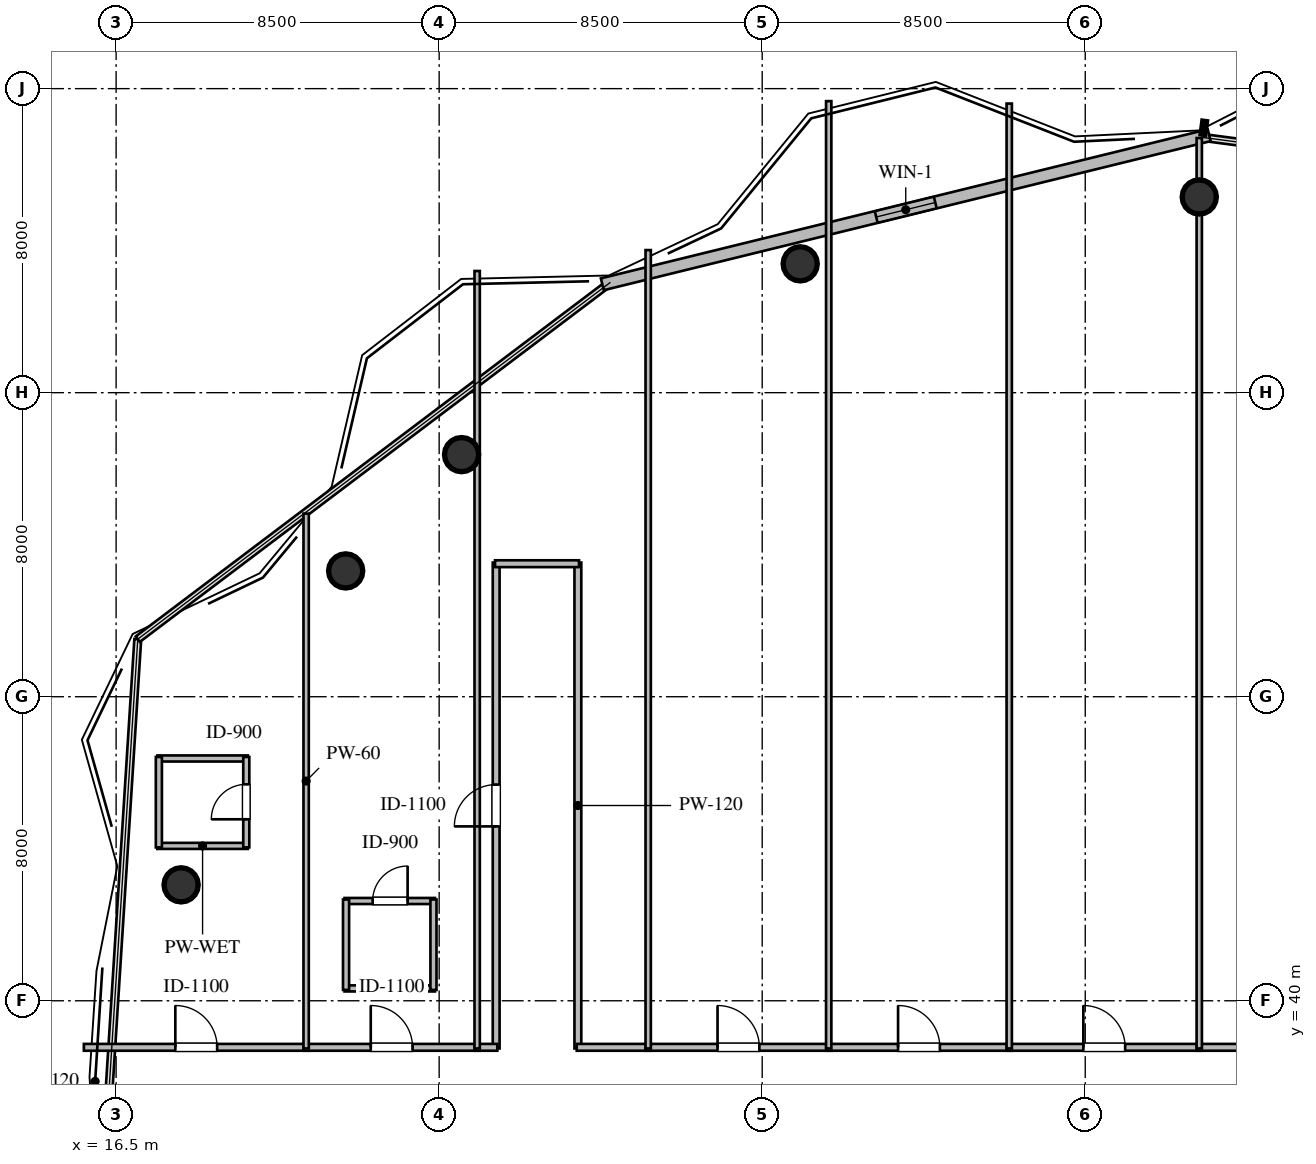
"""IFC4 building model, lengths in metres.
Left out: names, types, materials, properties, quantities, classifications, styles, units other than length and angle.
Written with IfcOpenShell. Run it as: python <this file> out.ifc"""

import sys

from ifc_helpers import new_model, si_unit, direction, frame, frame_2d, origin, origin_2d, place, context, subcontext, project, spatial, rectangle, circle, extrude, element, fill, save


model = new_model("IFC4")
c1 = context("Model", 3, precision=1e-05, world=origin(), true_north=direction((0.0, 1.0)))
c2 = subcontext(c1, "Body", "Model", "MODEL_VIEW")
j1 = project(units=[si_unit("LENGTHUNIT", "METRE"), si_unit("PLANEANGLEUNIT", "RADIAN")], contexts=[c1])
p1 = place(None, origin())
s1 = spatial("IfcSite", under=j1, at=p1, CompositionType="ELEMENT")
p2 = place(p1, origin())
s2 = spatial("IfcBuilding", under=s1, at=p2, CompositionType="ELEMENT")
p3 = place(p2, frame((0.0, 0.0, 258.6)))
s3 = spatial("IfcBuildingStorey", under=s2, at=p3, CompositionType="ELEMENT", Elevation=258.6)
for number, where, z_axis, x_axis in (
    (1, (45.0, 61.15, -0.24), (0.0, 0.0, 1.0), (1.0, 0.0, 0.0)),
    (2, (34.5, 59.39, -0.24), (0.0, 0.0, 1.0), (1.0, 0.0, 0.0)),
    (3, (25.59, 54.37, -0.24), (0.0, 0.0, 1.0), (1.0, 0.0, 0.0)),
    (4, (22.54, 51.31, -0.24), (0.0, 0.0, 1.0), (1.0, 0.0, 0.0)),
    (5, (18.21, 43.05, -0.24), (0.0, 0.0, 1.0), (1.0, 0.0, 0.0)),
):
    element("IfcColumn", number, at=place(p3, frame(where, z_axis=z_axis, x_axis=x_axis)), inside=s3, PredefinedType="COLUMN", context=c2, shape_type="SweptSolid", body=[
        extrude(circle(Radius=0.45, at=origin_2d()), origin(), (0.0, 0.0, 1.0), 4.04),
    ])
p4 = place(p3, frame((29.293, 58.852, 0.0), z_axis=(0.0, 0.0, 1.0), x_axis=(0.971137749742, 0.238519330508, 0.0)))
e6 = element("IfcWall", 6, at=p4, inside=s3, PredefinedType="STANDARD", context=c2, shape_type="SweptSolid", body=[
    extrude(rectangle(XDim=16.443, YDim=0.32, at=frame_2d((8.221, 0.0))), origin(), (0.0, 0.0, 1.0), 3.56),
])
p5 = place(p4, frame((7.421, 0.0, 1.05)))
e7 = element("IfcOpeningElement", 7, at=p5, cuts=e6, PredefinedType="OPENING", context=c2, shape_type="SweptSolid", body=[
    extrude(rectangle(XDim=1.6, YDim=1.5, at=frame_2d((0.8, 0.75))), frame((0.0, 0.17, 0.0), z_axis=(0.0, -1.0, 0.0), x_axis=(1.0, 0.0, 0.0)), (0.0, 0.0, 1.0), 0.34),
])
for number, where, z_axis, x_axis in (
    (8, (17.585, 44.075, 0.0), (0.0, 0.0, 1.0), (1.0, 0.0, 0.0)),
    (9, (17.585, 46.375, 0.0), (0.0, 0.0, 1.0), (1.0, 0.0, 0.0)),
    (10, (17.625, 44.035, 0.0), (0.0, 0.0, 1.0), (0.0, 1.0, 0.0)),
):
    element("IfcWall", number, at=place(p3, frame(where, z_axis=z_axis, x_axis=x_axis)), inside=s3, PredefinedType="PLUMBINGWALL", context=c2, shape_type="SweptSolid", body=[
        extrude(rectangle(XDim=2.38, YDim=0.16, at=frame_2d((1.19, 0.0))), origin(), (0.0, 0.0, 1.0), 3.56),
    ])
p6 = place(p3, frame((19.925, 44.035, 0.0), z_axis=(0.0, 0.0, 1.0), x_axis=(0.0, 1.0, 0.0)))
e11 = element("IfcWall", 11, at=p6, inside=s3, PredefinedType="PLUMBINGWALL", context=c2, shape_type="SweptSolid", body=[
    extrude(rectangle(XDim=2.38, YDim=0.16, at=frame_2d((1.19, 0.0))), origin(), (0.0, 0.0, 1.0), 3.56),
])
p7 = place(p6, frame((0.74, 0.0, 0.0)))
e12 = element("IfcOpeningElement", 12, at=p7, cuts=e11, PredefinedType="OPENING", context=c2, shape_type="SweptSolid", body=[
    extrude(rectangle(XDim=0.92, YDim=2.1, at=frame_2d((0.46, 1.05))), frame((0.0, 0.09, 0.0), z_axis=(0.0, -1.0, 0.0), x_axis=(1.0, 0.0, 0.0)), (0.0, 0.0, 1.0), 0.18),
])
p8 = place(p3, frame((22.51, 40.325, 0.0), z_axis=(0.0, 0.0, 1.0), x_axis=(1.0, 0.0, 0.0)))
e13 = element("IfcWall", 13, at=p8, inside=s3, PredefinedType="PLUMBINGWALL", context=c2, shape_type="SweptSolid", body=[
    extrude(rectangle(XDim=2.38, YDim=0.16, at=frame_2d((1.19, 0.0))), origin(), (0.0, 0.0, 1.0), 3.56),
])
p9 = place(p3, frame((22.51, 42.625, 0.0), z_axis=(0.0, 0.0, 1.0), x_axis=(1.0, 0.0, 0.0)))
e14 = element("IfcWall", 14, at=p9, inside=s3, PredefinedType="PLUMBINGWALL", context=c2, shape_type="SweptSolid", body=[
    extrude(rectangle(XDim=2.38, YDim=0.16, at=frame_2d((1.19, 0.0))), origin(), (0.0, 0.0, 1.0), 3.56),
])
p10 = place(p9, frame((0.74, 0.0, 0.0)))
e15 = element("IfcOpeningElement", 15, at=p10, cuts=e14, PredefinedType="OPENING", context=c2, shape_type="SweptSolid", body=[
    extrude(rectangle(XDim=0.92, YDim=2.1, at=frame_2d((0.46, 1.05))), frame((0.0, 0.09, 0.0), z_axis=(0.0, -1.0, 0.0), x_axis=(1.0, 0.0, 0.0)), (0.0, 0.0, 1.0), 0.18),
])
p11 = place(p3, frame((22.55, 40.285, 0.0), z_axis=(0.0, 0.0, 1.0), x_axis=(0.0, 1.0, 0.0)))
e16 = element("IfcWall", 16, at=p11, inside=s3, PredefinedType="PLUMBINGWALL", context=c2, shape_type="SweptSolid", body=[
    extrude(rectangle(XDim=2.38, YDim=0.16, at=frame_2d((1.19, 0.0))), origin(), (0.0, 0.0, 1.0), 3.006),
])
p12 = place(p3, frame((24.85, 40.285, 0.0), z_axis=(0.0, 0.0, 1.0), x_axis=(0.0, 1.0, 0.0)))
e17 = element("IfcWall", 17, at=p12, inside=s3, PredefinedType="PLUMBINGWALL", context=c2, shape_type="SweptSolid", body=[
    extrude(rectangle(XDim=2.38, YDim=0.16, at=frame_2d((1.19, 0.0))), origin(), (0.0, 0.0, 1.0), 3.56),
])
p13 = place(p3, frame((15.651, 38.775, 0.0), z_axis=(0.0, 0.0, 1.0), x_axis=(1.0, 0.0, 0.0)))
e18 = element("IfcWall", 18, at=p13, inside=s3, PredefinedType="PARTITIONING", context=c2, shape_type="SweptSolid", body=[
    extrude(rectangle(XDim=5.914, YDim=0.18, at=frame_2d((2.957, 0.0))), origin(), (0.0, 0.0, 1.0), 3.56),
])
p14 = place(p13, frame((2.407, 0.0, 0.0)))
e19 = element("IfcOpeningElement", 19, at=p14, cuts=e18, PredefinedType="OPENING", context=c2, shape_type="SweptSolid", body=[
    extrude(rectangle(XDim=1.1, YDim=2.1, at=frame_2d((0.55, 1.05))), frame((0.0, 0.1, 0.0), z_axis=(0.0, -1.0, 0.0), x_axis=(1.0, 0.0, 0.0)), (0.0, 0.0, 1.0), 0.2),
])
p15 = place(p3, frame((21.435, 38.775, 0.0), z_axis=(0.0, 0.0, 1.0), x_axis=(1.0, 0.0, 0.0)))
e20 = element("IfcWall", 20, at=p15, inside=s3, PredefinedType="PARTITIONING", context=c2, shape_type="SweptSolid", body=[
    extrude(rectangle(XDim=4.63, YDim=0.18, at=frame_2d((2.315, 0.0))), origin(), (0.0, 0.0, 1.0), 3.56),
])
p16 = place(p15, frame((1.765, 0.0, 0.0)))
e21 = element("IfcOpeningElement", 21, at=p16, cuts=e20, PredefinedType="OPENING", context=c2, shape_type="SweptSolid", body=[
    extrude(rectangle(XDim=1.1, YDim=2.1, at=frame_2d((0.55, 1.05))), frame((0.0, 0.1, 0.0), z_axis=(0.0, -1.0, 0.0), x_axis=(1.0, 0.0, 0.0)), (0.0, 0.0, 1.0), 0.2),
])
p17 = place(p3, frame((26.5, 38.745, 0.0), z_axis=(0.0, 0.0, 1.0), x_axis=(0.0, 1.0, 0.0)))
e22 = element("IfcWall", 22, at=p17, inside=s3, PredefinedType="PARTITIONING", context=c2, shape_type="SweptSolid", body=[
    extrude(rectangle(XDim=12.785, YDim=0.18, at=frame_2d((6.393, 0.0))), origin(), (0.0, 0.0, 1.0), 3.56),
])
p18 = place(p17, frame((5.843, 0.0, 0.0)))
e23 = element("IfcOpeningElement", 23, at=p18, cuts=e22, PredefinedType="OPENING", context=c2, shape_type="SweptSolid", body=[
    extrude(rectangle(XDim=1.1, YDim=2.1, at=frame_2d((0.55, 1.05))), frame((0.0, 0.1, 0.0), z_axis=(0.0, -1.0, 0.0), x_axis=(1.0, 0.0, 0.0)), (0.0, 0.0, 1.0), 0.2),
])
p19 = place(p3, frame((28.65, 51.53, 0.0), z_axis=(0.0, 0.0, 1.0), x_axis=(0.0, -1.0, 0.0)))
e24 = element("IfcWall", 24, at=p19, inside=s3, PredefinedType="PARTITIONING", context=c2, shape_type="SweptSolid", body=[
    extrude(rectangle(XDim=12.785, YDim=0.18, at=frame_2d((6.393, 0.0))), origin(), (0.0, 0.0, 1.0), 3.56),
])
p20 = place(p3, frame((26.47, 51.5, 0.0), z_axis=(0.0, 0.0, 1.0), x_axis=(1.0, 0.0, 0.0)))
e25 = element("IfcWall", 25, at=p20, inside=s3, PredefinedType="PARTITIONING", context=c2, shape_type="SweptSolid", body=[
    extrude(rectangle(XDim=2.21, YDim=0.18, at=frame_2d((1.105, 0.0))), origin(), (0.0, 0.0, 1.0), 3.56),
])
p21 = place(p3, frame((28.62, 38.775, 0.0), z_axis=(0.0, 0.0, 1.0), x_axis=(1.0, 0.0, 0.0)))
e26 = element("IfcWall", 26, at=p21, inside=s3, PredefinedType="PARTITIONING", context=c2, shape_type="SweptSolid", body=[
    extrude(rectangle(XDim=1.945, YDim=0.18, at=frame_2d((0.972, 0.0))), origin(), (0.0, 0.0, 1.0), 3.56),
])
p22 = place(p3, frame((25.935, 38.775, 0.0), z_axis=(0.0, 0.0, 1.0), x_axis=(1.0, 0.0, 0.0)))
e27 = element("IfcWall", 27, at=p22, inside=s3, PredefinedType="PARTITIONING", context=c2, shape_type="SweptSolid", body=[
    extrude(rectangle(XDim=0.595, YDim=0.18, at=frame_2d((0.297, 0.0))), origin(), (0.0, 0.0, 1.0), 3.56),
])
p23 = place(p3, frame((30.435, 38.775, 0.0), z_axis=(0.0, 0.0, 1.0), x_axis=(1.0, 0.0, 0.0)))
e28 = element("IfcWall", 28, at=p23, inside=s3, PredefinedType="PARTITIONING", context=c2, shape_type="SweptSolid", body=[
    extrude(rectangle(XDim=4.88, YDim=0.18, at=frame_2d((2.44, 0.0))), origin(), (0.0, 0.0, 1.0), 3.56),
])
p24 = place(p23, frame((1.89, 0.0, 0.0)))
e29 = element("IfcOpeningElement", 29, at=p24, cuts=e28, PredefinedType="OPENING", context=c2, shape_type="SweptSolid", body=[
    extrude(rectangle(XDim=1.1, YDim=2.1, at=frame_2d((0.55, 1.05))), frame((0.0, 0.1, 0.0), z_axis=(0.0, -1.0, 0.0), x_axis=(1.0, 0.0, 0.0)), (0.0, 0.0, 1.0), 0.2),
])
p25 = place(p3, frame((35.185, 38.775, 0.0), z_axis=(0.0, 0.0, 1.0), x_axis=(1.0, 0.0, 0.0)))
e30 = element("IfcWall", 30, at=p25, inside=s3, PredefinedType="PARTITIONING", context=c2, shape_type="SweptSolid", body=[
    extrude(rectangle(XDim=4.88, YDim=0.18, at=frame_2d((2.44, 0.0))), origin(), (0.0, 0.0, 1.0), 3.56),
])
p26 = place(p25, frame((1.89, 0.0, 0.0)))
e31 = element("IfcOpeningElement", 31, at=p26, cuts=e30, PredefinedType="OPENING", context=c2, shape_type="SweptSolid", body=[
    extrude(rectangle(XDim=1.1, YDim=2.1, at=frame_2d((0.55, 1.05))), frame((0.0, 0.1, 0.0), z_axis=(0.0, -1.0, 0.0), x_axis=(1.0, 0.0, 0.0)), (0.0, 0.0, 1.0), 0.2),
])
p27 = place(p3, frame((39.935, 38.775, 0.0), z_axis=(0.0, 0.0, 1.0), x_axis=(1.0, 0.0, 0.0)))
e32 = element("IfcWall", 32, at=p27, inside=s3, PredefinedType="PARTITIONING", context=c2, shape_type="SweptSolid", body=[
    extrude(rectangle(XDim=5.13, YDim=0.18, at=frame_2d((2.565, 0.0))), origin(), (0.0, 0.0, 1.0), 3.56),
])
p28 = place(p27, frame((2.015, 0.0, 0.0)))
e33 = element("IfcOpeningElement", 33, at=p28, cuts=e32, PredefinedType="OPENING", context=c2, shape_type="SweptSolid", body=[
    extrude(rectangle(XDim=1.1, YDim=2.1, at=frame_2d((0.55, 1.05))), frame((0.0, 0.1, 0.0), z_axis=(0.0, -1.0, 0.0), x_axis=(1.0, 0.0, 0.0)), (0.0, 0.0, 1.0), 0.2),
])
p29 = place(p3, frame((44.935, 38.775, 0.0), z_axis=(0.0, 0.0, 1.0), x_axis=(1.0, 0.0, 0.0)))
e34 = element("IfcWall", 34, at=p29, inside=s3, PredefinedType="PARTITIONING", context=c2, shape_type="SweptSolid", body=[
    extrude(rectangle(XDim=5.13, YDim=0.18, at=frame_2d((2.565, 0.0))), origin(), (0.0, 0.0, 1.0), 3.56),
])
p30 = place(p29, frame((2.015, 0.0, 0.0)))
e35 = element("IfcOpeningElement", 35, at=p30, cuts=e34, PredefinedType="OPENING", context=c2, shape_type="SweptSolid", body=[
    extrude(rectangle(XDim=1.1, YDim=2.1, at=frame_2d((0.55, 1.05))), frame((0.0, 0.1, 0.0), z_axis=(0.0, -1.0, 0.0), x_axis=(1.0, 0.0, 0.0)), (0.0, 0.0, 1.0), 0.2),
])
p31 = place(p3, frame((21.5, 52.818, 0.0), z_axis=(0.0, 0.0, 1.0), x_axis=(0.0, -1.0, 0.0)))
e36 = element("IfcWall", 36, at=p31, inside=s3, PredefinedType="PARTITIONING", context=c2, shape_type="SweptSolid", body=[
    extrude(rectangle(XDim=14.073, YDim=0.14, at=frame_2d((7.037, 0.0))), origin(), (0.0, 0.0, 1.0), 3.006),
])
p32 = place(p3, frame((26.0, 59.202, 0.0), z_axis=(0.0, 0.0, 1.0), x_axis=(0.0, -1.0, 0.0)))
e37 = element("IfcWall", 37, at=p32, inside=s3, PredefinedType="PARTITIONING", context=c2, shape_type="SweptSolid", body=[
    extrude(rectangle(XDim=20.457, YDim=0.14, at=frame_2d((10.229, 0.0))), origin(), (0.0, 0.0, 1.0), 3.006),
])
p33 = place(p3, frame((30.5, 59.752, 0.0), z_axis=(0.0, 0.0, 1.0), x_axis=(0.0, -1.0, 0.0)))
e38 = element("IfcWall", 38, at=p33, inside=s3, PredefinedType="PARTITIONING", context=c2, shape_type="SweptSolid", body=[
    extrude(rectangle(XDim=21.007, YDim=0.14, at=frame_2d((10.503, 0.0))), origin(), (0.0, 0.0, 1.0), 3.56),
])
p34 = place(p3, frame((35.25, 63.671, 0.0), z_axis=(0.0, 0.0, 1.0), x_axis=(0.0, -1.0, 0.0)))
e39 = element("IfcWall", 39, at=p34, inside=s3, PredefinedType="PARTITIONING", context=c2, shape_type="SweptSolid", body=[
    extrude(rectangle(XDim=24.926, YDim=0.14, at=frame_2d((12.463, 0.0))), origin(), (0.0, 0.0, 1.0), 3.006),
])
p35 = place(p3, frame((40.0, 63.607, 0.0), z_axis=(0.0, 0.0, 1.0), x_axis=(0.0, -1.0, 0.0)))
e40 = element("IfcWall", 40, at=p35, inside=s3, PredefinedType="PARTITIONING", context=c2, shape_type="SweptSolid", body=[
    extrude(rectangle(XDim=24.862, YDim=0.14, at=frame_2d((12.431, 0.0))), origin(), (0.0, 0.0, 1.0), 3.56),
])
p36 = place(p3, frame((45.0, 62.7, 0.0), z_axis=(0.0, 0.0, 1.0), x_axis=(0.0, -1.0, 0.0)))
e41 = element("IfcWall", 41, at=p36, inside=s3, PredefinedType="PARTITIONING", context=c2, shape_type="SweptSolid", body=[
    extrude(rectangle(XDim=23.955, YDim=0.14, at=frame_2d((11.978, 0.0))), origin(), (0.0, 0.0, 1.0), 3.006),
])
p37 = place(p5, origin())
e42 = element("IfcWindow", 42, at=p37, inside=s3, PartitioningType="SINGLE_PANEL", PredefinedType="WINDOW", context=c2, shape_type="SweptSolid", body=[
    extrude(rectangle(XDim=1.6, YDim=1.5, at=frame_2d((0.8, 0.75))), frame((0.0, 0.03, 0.0), z_axis=(0.0, -1.0, 0.0), x_axis=(1.0, 0.0, 0.0)), (0.0, 0.0, 1.0), 0.06),
])
fill(e7, e42)
p38 = place(p7, origin())
e43 = element("IfcDoor", 43, at=p38, inside=s3, OperationType="SINGLE_SWING_LEFT", PredefinedType="DOOR", context=c2, shape_type="SweptSolid", body=[
    extrude(rectangle(XDim=0.92, YDim=2.1, at=frame_2d((0.46, 1.05))), frame((0.0, 0.025, 0.0), z_axis=(0.0, -1.0, 0.0), x_axis=(1.0, 0.0, 0.0)), (0.0, 0.0, 1.0), 0.05),
])
fill(e12, e43)
p39 = place(p10, origin())
e44 = element("IfcDoor", 44, at=p39, inside=s3, OperationType="SINGLE_SWING_RIGHT", PredefinedType="DOOR", context=c2, shape_type="SweptSolid", body=[
    extrude(rectangle(XDim=0.92, YDim=2.1, at=frame_2d((0.46, 1.05))), frame((0.0, 0.025, 0.0), z_axis=(0.0, -1.0, 0.0), x_axis=(1.0, 0.0, 0.0)), (0.0, 0.0, 1.0), 0.05),
])
fill(e15, e44)
p40 = place(p14, origin())
e45 = element("IfcDoor", 45, at=p40, inside=s3, OperationType="SINGLE_SWING_LEFT", PredefinedType="DOOR", context=c2, shape_type="SweptSolid", body=[
    extrude(rectangle(XDim=1.1, YDim=2.1, at=frame_2d((0.55, 1.05))), frame((0.0, 0.025, 0.0), z_axis=(0.0, -1.0, 0.0), x_axis=(1.0, 0.0, 0.0)), (0.0, 0.0, 1.0), 0.05),
])
fill(e19, e45)
p41 = place(p16, origin())
e46 = element("IfcDoor", 46, at=p41, inside=s3, OperationType="SINGLE_SWING_LEFT", PredefinedType="DOOR", context=c2, shape_type="SweptSolid", body=[
    extrude(rectangle(XDim=1.1, YDim=2.1, at=frame_2d((0.55, 1.05))), frame((0.0, 0.025, 0.0), z_axis=(0.0, -1.0, 0.0), x_axis=(1.0, 0.0, 0.0)), (0.0, 0.0, 1.0), 0.05),
])
fill(e21, e46)
p42 = place(p18, origin())
e47 = element("IfcDoor", 47, at=p42, inside=s3, OperationType="SINGLE_SWING_LEFT", PredefinedType="DOOR", context=c2, shape_type="SweptSolid", body=[
    extrude(rectangle(XDim=1.1, YDim=2.1, at=frame_2d((0.55, 1.05))), frame((0.0, 0.025, 0.0), z_axis=(0.0, -1.0, 0.0), x_axis=(1.0, 0.0, 0.0)), (0.0, 0.0, 1.0), 0.05),
])
fill(e23, e47)
p43 = place(p24, origin())
e48 = element("IfcDoor", 48, at=p43, inside=s3, OperationType="SINGLE_SWING_LEFT", PredefinedType="DOOR", context=c2, shape_type="SweptSolid", body=[
    extrude(rectangle(XDim=1.1, YDim=2.1, at=frame_2d((0.55, 1.05))), frame((0.0, 0.025, 0.0), z_axis=(0.0, -1.0, 0.0), x_axis=(1.0, 0.0, 0.0)), (0.0, 0.0, 1.0), 0.05),
])
fill(e29, e48)
p44 = place(p26, origin())
e49 = element("IfcDoor", 49, at=p44, inside=s3, OperationType="SINGLE_SWING_LEFT", PredefinedType="DOOR", context=c2, shape_type="SweptSolid", body=[
    extrude(rectangle(XDim=1.1, YDim=2.1, at=frame_2d((0.55, 1.05))), frame((0.0, 0.025, 0.0), z_axis=(0.0, -1.0, 0.0), x_axis=(1.0, 0.0, 0.0)), (0.0, 0.0, 1.0), 0.05),
])
fill(e31, e49)
p45 = place(p28, origin())
e50 = element("IfcDoor", 50, at=p45, inside=s3, OperationType="SINGLE_SWING_LEFT", PredefinedType="DOOR", context=c2, shape_type="SweptSolid", body=[
    extrude(rectangle(XDim=1.1, YDim=2.1, at=frame_2d((0.55, 1.05))), frame((0.0, 0.025, 0.0), z_axis=(0.0, -1.0, 0.0), x_axis=(1.0, 0.0, 0.0)), (0.0, 0.0, 1.0), 0.05),
])
fill(e33, e50)
save(model, sys.argv[1])
